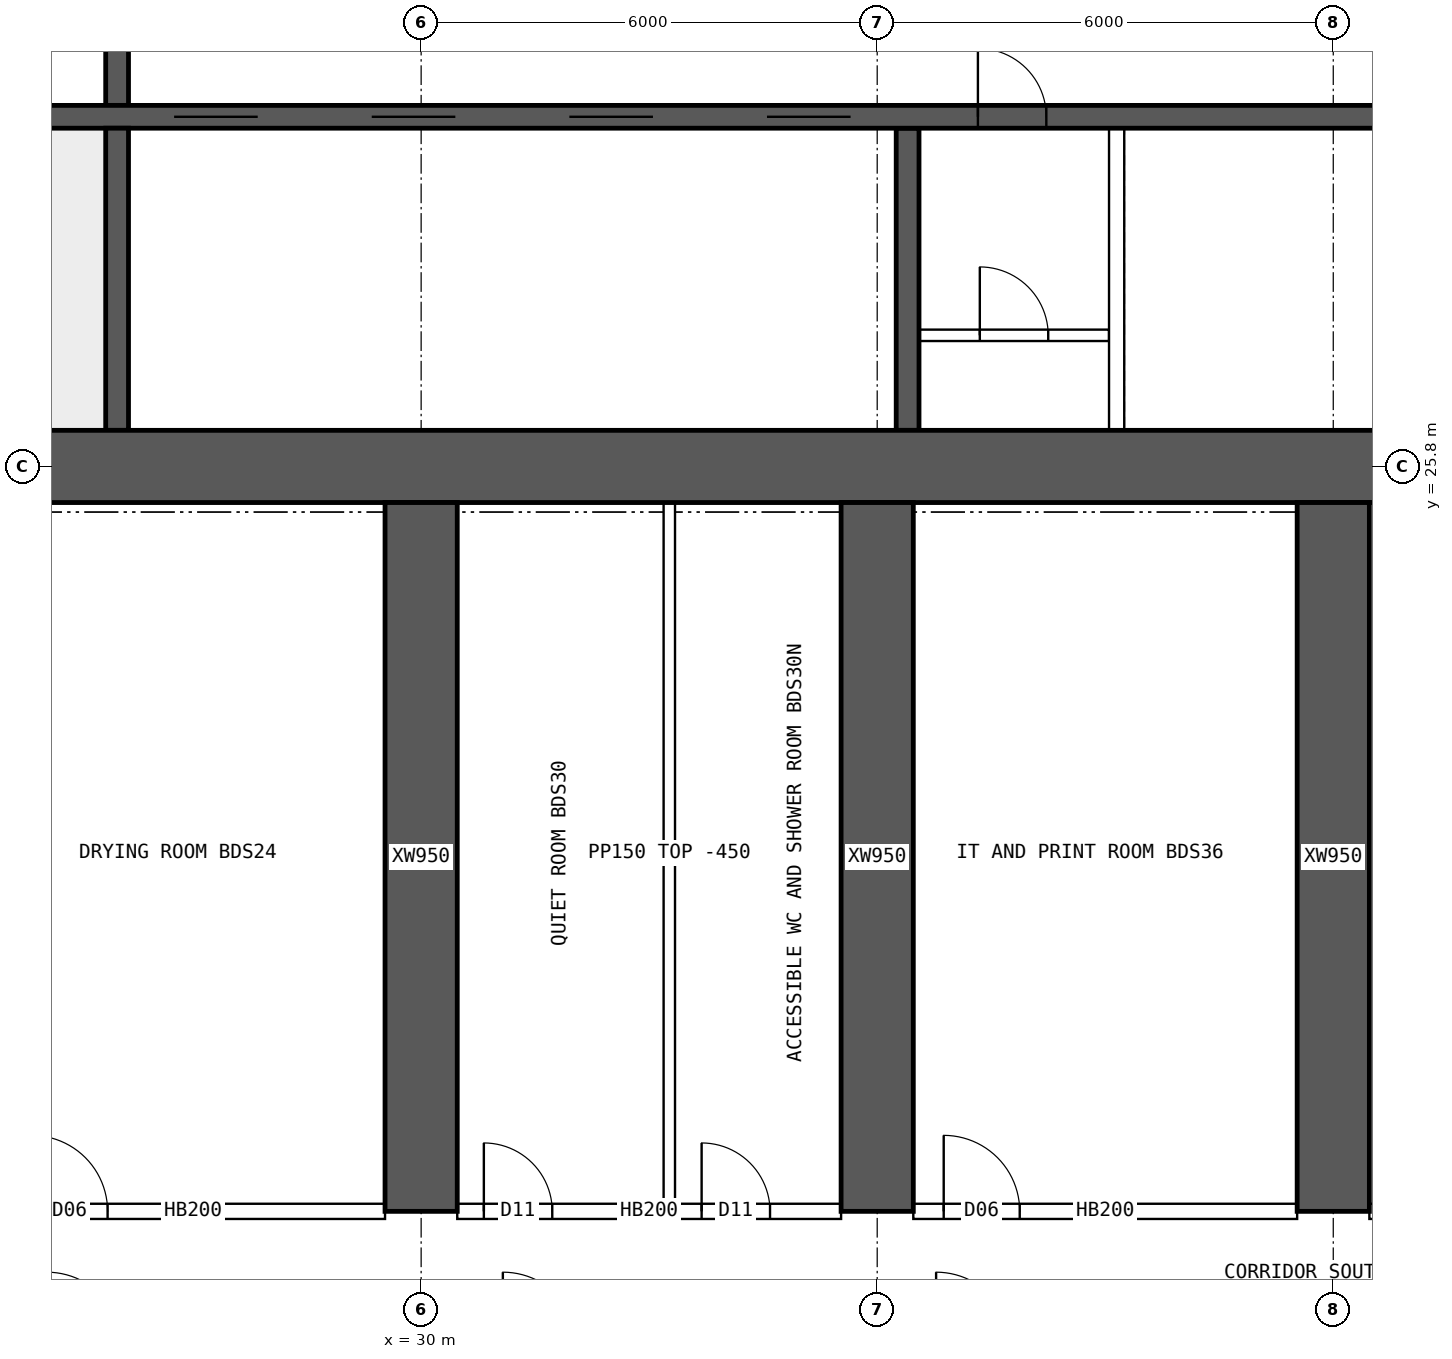
"""IFC4 building model, lengths in metres.
Left out: names, types, materials, properties, quantities, classifications, styles, units other than length and angle.
Written with IfcOpenShell. Run it as: python <this file> out.ifc"""

import sys

from ifc_helpers import new_model, si_unit, direction, frame, frame_2d, origin, place, context, subcontext, project, spatial, rectangle, extrude, element, fill, save


model = new_model("IFC4")
c1 = context("Model", 3, precision=1e-05, world=origin(), true_north=direction((0.0, 1.0)))
c2 = subcontext(c1, "Body", "Model", "MODEL_VIEW")
j1 = project(units=[si_unit("LENGTHUNIT", "METRE"), si_unit("PLANEANGLEUNIT", "RADIAN")], contexts=[c1])
p1 = place(None, origin())
s1 = spatial("IfcSite", under=j1, at=p1, CompositionType="ELEMENT")
p2 = place(p1, origin())
s2 = spatial("IfcBuilding", under=s1, at=p2, CompositionType="ELEMENT")
p3 = place(p2, frame((0.0, 0.0, 110.65)))
s3 = spatial("IfcBuildingStorey", under=s2, at=p3, CompositionType="ELEMENT", Elevation=110.65)
p4 = place(p3, frame((18.0, 25.8, 0.0), z_axis=(0.0, 0.0, 1.0), x_axis=(1.0, 0.0, 0.0)))
e1 = element("IfcWall", 1, at=p4, inside=s3, PredefinedType="SHEAR", context=c2, shape_type="SweptSolid", body=[
    extrude(rectangle(XDim=48.0, YDim=0.95, at=frame_2d((24.0, 0.0))), origin(), (0.0, 0.0, 1.0), 3.75),
])
p5 = place(p3, frame((18.475, 30.4, 0.0), z_axis=(0.0, 0.0, 1.0), x_axis=(1.0, 0.0, 0.0)))
e2 = element("IfcWall", 2, at=p5, inside=s3, PredefinedType="SHEAR", context=c2, shape_type="SweptSolid", body=[
    extrude(rectangle(XDim=47.05, YDim=0.3, at=frame_2d((23.525, 0.0))), origin(), (0.0, 0.0, 1.0), 3.75),
])
p6 = place(p5, frame((0.4, 0.0, 0.0)))
e3 = element("IfcOpeningElement", 3, at=p6, cuts=e2, PredefinedType="OPENING", context=c2, shape_type="SweptSolid", body=[
    extrude(rectangle(XDim=1.0, YDim=2.1, at=frame_2d((0.5, 1.05))), frame((0.0, 0.16, 0.0), z_axis=(0.0, -1.0, 0.0), x_axis=(1.0, 0.0, 0.0)), (0.0, 0.0, 1.0), 0.32),
])
p7 = place(p5, frame((45.65, 0.0, 0.0)))
e4 = element("IfcOpeningElement", 4, at=p7, cuts=e2, PredefinedType="OPENING", context=c2, shape_type="SweptSolid", body=[
    extrude(rectangle(XDim=1.0, YDim=2.1, at=frame_2d((0.5, 1.05))), frame((0.0, 0.16, 0.0), z_axis=(0.0, -1.0, 0.0), x_axis=(1.0, 0.0, 0.0)), (0.0, 0.0, 1.0), 0.32),
])
p8 = place(p5, frame((8.275, 0.0, 0.0)))
e5 = element("IfcOpeningElement", 5, at=p8, cuts=e2, PredefinedType="OPENING", context=c2, shape_type="SweptSolid", body=[
    extrude(rectangle(XDim=1.1, YDim=2.1, at=frame_2d((0.55, 1.05))), frame((0.0, 0.16, 0.0), z_axis=(0.0, -1.0, 0.0), x_axis=(1.0, 0.0, 0.0)), (0.0, 0.0, 1.0), 0.32),
])
p9 = place(p5, frame((10.875, 0.0, 0.0)))
e6 = element("IfcOpeningElement", 6, at=p9, cuts=e2, PredefinedType="OPENING", context=c2, shape_type="SweptSolid", body=[
    extrude(rectangle(XDim=1.1, YDim=2.1, at=frame_2d((0.55, 1.05))), frame((0.0, 0.16, 0.0), z_axis=(0.0, -1.0, 0.0), x_axis=(1.0, 0.0, 0.0)), (0.0, 0.0, 1.0), 0.32),
])
p10 = place(p5, frame((13.475, 0.0, 0.0)))
e7 = element("IfcOpeningElement", 7, at=p10, cuts=e2, PredefinedType="OPENING", context=c2, shape_type="SweptSolid", body=[
    extrude(rectangle(XDim=1.1, YDim=2.1, at=frame_2d((0.55, 1.05))), frame((0.0, 0.16, 0.0), z_axis=(0.0, -1.0, 0.0), x_axis=(1.0, 0.0, 0.0)), (0.0, 0.0, 1.0), 0.32),
])
p11 = place(p5, frame((16.075, 0.0, 0.0)))
e8 = element("IfcOpeningElement", 8, at=p11, cuts=e2, PredefinedType="OPENING", context=c2, shape_type="SweptSolid", body=[
    extrude(rectangle(XDim=1.1, YDim=2.1, at=frame_2d((0.55, 1.05))), frame((0.0, 0.16, 0.0), z_axis=(0.0, -1.0, 0.0), x_axis=(1.0, 0.0, 0.0)), (0.0, 0.0, 1.0), 0.32),
])
p12 = place(p5, frame((18.85, 0.0, 0.0)))
e9 = element("IfcOpeningElement", 9, at=p12, cuts=e2, PredefinedType="OPENING", context=c2, shape_type="SweptSolid", body=[
    extrude(rectangle(XDim=0.9, YDim=2.1, at=frame_2d((0.45, 1.05))), frame((0.0, 0.16, 0.0), z_axis=(0.0, -1.0, 0.0), x_axis=(1.0, 0.0, 0.0)), (0.0, 0.0, 1.0), 0.32),
])
p13 = place(p5, frame((30.142, 0.0, 0.0)))
e10 = element("IfcOpeningElement", 10, at=p13, cuts=e2, PredefinedType="OPENING", context=c2, shape_type="SweptSolid", body=[
    extrude(rectangle(XDim=1.1, YDim=2.1, at=frame_2d((0.55, 1.05))), frame((0.0, 0.16, 0.0), z_axis=(0.0, -1.0, 0.0), x_axis=(1.0, 0.0, 0.0)), (0.0, 0.0, 1.0), 0.32),
])
p14 = place(p5, frame((33.675, 0.0, 0.0)))
e11 = element("IfcOpeningElement", 11, at=p14, cuts=e2, PredefinedType="OPENING", context=c2, shape_type="SweptSolid", body=[
    extrude(rectangle(XDim=1.1, YDim=2.1, at=frame_2d((0.55, 1.05))), frame((0.0, 0.16, 0.0), z_axis=(0.0, -1.0, 0.0), x_axis=(1.0, 0.0, 0.0)), (0.0, 0.0, 1.0), 0.32),
])
p15 = place(p5, frame((37.208, 0.0, 0.0)))
e12 = element("IfcOpeningElement", 12, at=p15, cuts=e2, PredefinedType="OPENING", context=c2, shape_type="SweptSolid", body=[
    extrude(rectangle(XDim=1.1, YDim=2.1, at=frame_2d((0.55, 1.05))), frame((0.0, 0.16, 0.0), z_axis=(0.0, -1.0, 0.0), x_axis=(1.0, 0.0, 0.0)), (0.0, 0.0, 1.0), 0.32),
])
p16 = place(p3, frame((26.0, 26.275, 0.0), z_axis=(0.0, 0.0, 1.0), x_axis=(0.0, 1.0, 0.0)))
e13 = element("IfcWall", 13, at=p16, inside=s3, PredefinedType="SHEAR", context=c2, shape_type="SweptSolid", body=[
    extrude(rectangle(XDim=3.975, YDim=0.3, at=frame_2d((1.988, 0.0))), origin(), (0.0, 0.0, 1.0), 3.75),
])
p17 = place(p3, frame((26.0, 30.55, 0.0), z_axis=(0.0, 0.0, 1.0), x_axis=(0.0, 1.0, 0.0)))
e14 = element("IfcWall", 14, at=p17, inside=s3, PredefinedType="SHEAR", context=c2, shape_type="SweptSolid", body=[
    extrude(rectangle(XDim=3.9, YDim=0.3, at=frame_2d((1.95, 0.0))), origin(), (0.0, 0.0, 1.0), 3.75),
])
p18 = place(p17, frame((1.4, 0.0, 0.0)))
e15 = element("IfcOpeningElement", 15, at=p18, cuts=e14, PredefinedType="OPENING", context=c2, shape_type="SweptSolid", body=[
    extrude(rectangle(XDim=1.2, YDim=2.1, at=frame_2d((0.6, 1.05))), frame((0.0, 0.16, 0.0), z_axis=(0.0, -1.0, 0.0), x_axis=(1.0, 0.0, 0.0)), (0.0, 0.0, 1.0), 0.32),
])
p19 = place(p3, frame((36.4, 26.275, 0.0), z_axis=(0.0, 0.0, 1.0), x_axis=(0.0, 1.0, 0.0)))
e16 = element("IfcWall", 16, at=p19, inside=s3, PredefinedType="SHEAR", context=c2, shape_type="SweptSolid", body=[
    extrude(rectangle(XDim=3.975, YDim=0.3, at=frame_2d((1.988, 0.0))), origin(), (0.0, 0.0, 1.0), 3.75),
])
for number, where, z_axis, x_axis in (
    (17, (30.0, 16.0, 0.0), (0.0, 0.0, 1.0), (0.0, 1.0, 0.0)),
    (18, (36.0, 16.0, 0.0), (0.0, 0.0, 1.0), (0.0, 1.0, 0.0)),
    (19, (42.0, 16.0, 0.0), (0.0, 0.0, 1.0), (0.0, 1.0, 0.0)),
):
    element("IfcWall", number, at=place(p3, frame(where, z_axis=z_axis, x_axis=x_axis)), inside=s3, PredefinedType="SHEAR", context=c2, shape_type="SweptSolid", body=[
        extrude(rectangle(XDim=9.325, YDim=0.95, at=frame_2d((4.663, 0.0))), origin(), (0.0, 0.0, 1.0), 3.75),
    ])
p20 = place(p3, frame((36.55, 27.525, 0.0), z_axis=(0.0, 0.0, 1.0), x_axis=(1.0, 0.0, 0.0)))
e20 = element("IfcWall", 20, at=p20, inside=s3, PredefinedType="SOLIDWALL", context=c2, shape_type="SweptSolid", body=[
    extrude(rectangle(XDim=2.5, YDim=0.15, at=frame_2d((1.25, 0.0))), origin(), (0.0, 0.0, 1.0), 3.3),
])
p21 = place(p20, frame((0.8, 0.0, 0.0)))
e21 = element("IfcOpeningElement", 21, at=p21, cuts=e20, PredefinedType="OPENING", context=c2, shape_type="SweptSolid", body=[
    extrude(rectangle(XDim=0.9, YDim=2.1, at=frame_2d((0.45, 1.05))), frame((0.0, 0.085, 0.0), z_axis=(0.0, -1.0, 0.0), x_axis=(1.0, 0.0, 0.0)), (0.0, 0.0, 1.0), 0.17),
])
p22 = place(p3, frame((39.15, 26.275, 0.0), z_axis=(0.0, 0.0, 1.0), x_axis=(0.0, 1.0, 0.0)))
e22 = element("IfcWall", 22, at=p22, inside=s3, PredefinedType="SOLIDWALL", context=c2, shape_type="SweptSolid", body=[
    extrude(rectangle(XDim=3.975, YDim=0.2, at=frame_2d((1.988, 0.0))), origin(), (0.0, 0.0, 1.0), 3.3),
])
p23 = place(p3, frame((24.475, 16.0, 0.0), z_axis=(0.0, 0.0, 1.0), x_axis=(1.0, 0.0, 0.0)))
e23 = element("IfcWall", 23, at=p23, inside=s3, PredefinedType="SOLIDWALL", context=c2, shape_type="SweptSolid", body=[
    extrude(rectangle(XDim=5.05, YDim=0.2, at=frame_2d((2.525, 0.0))), origin(), (0.0, 0.0, 1.0), 3.3),
])
p24 = place(p23, frame((0.4, 0.0, 0.0)))
e24 = element("IfcOpeningElement", 24, at=p24, cuts=e23, PredefinedType="OPENING", context=c2, shape_type="SweptSolid", body=[
    extrude(rectangle(XDim=1.0, YDim=2.1, at=frame_2d((0.5, 1.05))), frame((0.0, 0.11, 0.0), z_axis=(0.0, -1.0, 0.0), x_axis=(1.0, 0.0, 0.0)), (0.0, 0.0, 1.0), 0.22),
])
p25 = place(p3, frame((30.475, 16.0, 0.0), z_axis=(0.0, 0.0, 1.0), x_axis=(1.0, 0.0, 0.0)))
e25 = element("IfcWall", 25, at=p25, inside=s3, PredefinedType="SOLIDWALL", context=c2, shape_type="SweptSolid", body=[
    extrude(rectangle(XDim=5.05, YDim=0.2, at=frame_2d((2.525, 0.0))), origin(), (0.0, 0.0, 1.0), 3.3),
])
p26 = place(p25, frame((0.35, 0.0, 0.0)))
e26 = element("IfcOpeningElement", 26, at=p26, cuts=e25, PredefinedType="OPENING", context=c2, shape_type="SweptSolid", body=[
    extrude(rectangle(XDim=0.9, YDim=2.1, at=frame_2d((0.45, 1.05))), frame((0.0, 0.11, 0.0), z_axis=(0.0, -1.0, 0.0), x_axis=(1.0, 0.0, 0.0)), (0.0, 0.0, 1.0), 0.22),
])
p27 = place(p25, frame((3.215, 0.0, 0.0)))
e27 = element("IfcOpeningElement", 27, at=p27, cuts=e25, PredefinedType="OPENING", context=c2, shape_type="SweptSolid", body=[
    extrude(rectangle(XDim=0.9, YDim=2.1, at=frame_2d((0.45, 1.05))), frame((0.0, 0.11, 0.0), z_axis=(0.0, -1.0, 0.0), x_axis=(1.0, 0.0, 0.0)), (0.0, 0.0, 1.0), 0.22),
])
p28 = place(p3, frame((36.475, 16.0, 0.0), z_axis=(0.0, 0.0, 1.0), x_axis=(1.0, 0.0, 0.0)))
e28 = element("IfcWall", 28, at=p28, inside=s3, PredefinedType="SOLIDWALL", context=c2, shape_type="SweptSolid", body=[
    extrude(rectangle(XDim=5.05, YDim=0.2, at=frame_2d((2.525, 0.0))), origin(), (0.0, 0.0, 1.0), 3.3),
])
p29 = place(p28, frame((0.4, 0.0, 0.0)))
e29 = element("IfcOpeningElement", 29, at=p29, cuts=e28, PredefinedType="OPENING", context=c2, shape_type="SweptSolid", body=[
    extrude(rectangle(XDim=1.0, YDim=2.1, at=frame_2d((0.5, 1.05))), frame((0.0, 0.11, 0.0), z_axis=(0.0, -1.0, 0.0), x_axis=(1.0, 0.0, 0.0)), (0.0, 0.0, 1.0), 0.22),
])
p30 = place(p3, frame((42.475, 16.0, 0.0), z_axis=(0.0, 0.0, 1.0), x_axis=(1.0, 0.0, 0.0)))
e30 = element("IfcWall", 30, at=p30, inside=s3, PredefinedType="SOLIDWALL", context=c2, shape_type="SweptSolid", body=[
    extrude(rectangle(XDim=5.05, YDim=0.2, at=frame_2d((2.525, 0.0))), origin(), (0.0, 0.0, 1.0), 3.3),
])
p31 = place(p30, frame((0.35, 0.0, 0.0)))
e31 = element("IfcOpeningElement", 31, at=p31, cuts=e30, PredefinedType="OPENING", context=c2, shape_type="SweptSolid", body=[
    extrude(rectangle(XDim=0.9, YDim=2.1, at=frame_2d((0.45, 1.05))), frame((0.0, 0.11, 0.0), z_axis=(0.0, -1.0, 0.0), x_axis=(1.0, 0.0, 0.0)), (0.0, 0.0, 1.0), 0.22),
])
p32 = place(p30, frame((3.645, 0.0, 0.0)))
e32 = element("IfcOpeningElement", 32, at=p32, cuts=e30, PredefinedType="OPENING", context=c2, shape_type="SweptSolid", body=[
    extrude(rectangle(XDim=0.9, YDim=2.1, at=frame_2d((0.45, 1.05))), frame((0.0, 0.11, 0.0), z_axis=(0.0, -1.0, 0.0), x_axis=(1.0, 0.0, 0.0)), (0.0, 0.0, 1.0), 0.22),
])
p33 = place(p3, frame((33.265, 16.1, 0.0), z_axis=(0.0, 0.0, 1.0), x_axis=(0.0, 1.0, 0.0)))
e33 = element("IfcWall", 33, at=p33, inside=s3, PredefinedType="PARTITIONING", context=c2, shape_type="SweptSolid", body=[
    extrude(rectangle(XDim=9.225, YDim=0.15, at=frame_2d((4.612, 0.0))), origin(), (0.0, 0.0, 1.0), 3.3),
])
p34 = place(p8, origin())
e34 = element("IfcDoor", 34, at=p34, inside=s3, OperationType="DOUBLE_DOOR_SLIDING", PredefinedType="DOOR", context=c2, shape_type="SweptSolid", body=[
    extrude(rectangle(XDim=1.1, YDim=2.1, at=frame_2d((0.55, 1.05))), frame((0.0, 0.025, 0.0), z_axis=(0.0, -1.0, 0.0), x_axis=(1.0, 0.0, 0.0)), (0.0, 0.0, 1.0), 0.05),
])
fill(e5, e34)
p35 = place(p9, origin())
e35 = element("IfcDoor", 35, at=p35, inside=s3, OperationType="DOUBLE_DOOR_SLIDING", PredefinedType="DOOR", context=c2, shape_type="SweptSolid", body=[
    extrude(rectangle(XDim=1.1, YDim=2.1, at=frame_2d((0.55, 1.05))), frame((0.0, 0.025, 0.0), z_axis=(0.0, -1.0, 0.0), x_axis=(1.0, 0.0, 0.0)), (0.0, 0.0, 1.0), 0.05),
])
fill(e6, e35)
p36 = place(p10, origin())
e36 = element("IfcDoor", 36, at=p36, inside=s3, OperationType="DOUBLE_DOOR_SLIDING", PredefinedType="DOOR", context=c2, shape_type="SweptSolid", body=[
    extrude(rectangle(XDim=1.1, YDim=2.1, at=frame_2d((0.55, 1.05))), frame((0.0, 0.025, 0.0), z_axis=(0.0, -1.0, 0.0), x_axis=(1.0, 0.0, 0.0)), (0.0, 0.0, 1.0), 0.05),
])
fill(e7, e36)
p37 = place(p11, origin())
e37 = element("IfcDoor", 37, at=p37, inside=s3, OperationType="DOUBLE_DOOR_SLIDING", PredefinedType="DOOR", context=c2, shape_type="SweptSolid", body=[
    extrude(rectangle(XDim=1.1, YDim=2.1, at=frame_2d((0.55, 1.05))), frame((0.0, 0.025, 0.0), z_axis=(0.0, -1.0, 0.0), x_axis=(1.0, 0.0, 0.0)), (0.0, 0.0, 1.0), 0.05),
])
fill(e8, e37)
p38 = place(p21, origin())
e38 = element("IfcDoor", 38, at=p38, inside=s3, OperationType="SINGLE_SWING_LEFT", PredefinedType="DOOR", context=c2, shape_type="SweptSolid", body=[
    extrude(rectangle(XDim=0.9, YDim=2.1, at=frame_2d((0.45, 1.05))), frame((0.0, 0.025, 0.0), z_axis=(0.0, -1.0, 0.0), x_axis=(1.0, 0.0, 0.0)), (0.0, 0.0, 1.0), 0.05),
])
fill(e21, e38)
p39 = place(p12, origin())
e39 = element("IfcDoor", 39, at=p39, inside=s3, OperationType="SINGLE_SWING_LEFT", PredefinedType="DOOR", context=c2, shape_type="SweptSolid", body=[
    extrude(rectangle(XDim=0.9, YDim=2.1, at=frame_2d((0.45, 1.05))), frame((0.0, 0.025, 0.0), z_axis=(0.0, -1.0, 0.0), x_axis=(1.0, 0.0, 0.0)), (0.0, 0.0, 1.0), 0.05),
])
fill(e9, e39)
p40 = place(p24, origin())
e40 = element("IfcDoor", 40, at=p40, inside=s3, OperationType="SINGLE_SWING_LEFT", PredefinedType="DOOR", context=c2, shape_type="SweptSolid", body=[
    extrude(rectangle(XDim=1.0, YDim=2.1, at=frame_2d((0.5, 1.05))), frame((0.0, 0.025, 0.0), z_axis=(0.0, -1.0, 0.0), x_axis=(1.0, 0.0, 0.0)), (0.0, 0.0, 1.0), 0.05),
])
fill(e24, e40)
p41 = place(p26, origin())
e41 = element("IfcDoor", 41, at=p41, inside=s3, OperationType="SINGLE_SWING_LEFT", PredefinedType="DOOR", context=c2, shape_type="SweptSolid", body=[
    extrude(rectangle(XDim=0.9, YDim=2.1, at=frame_2d((0.45, 1.05))), frame((0.0, 0.025, 0.0), z_axis=(0.0, -1.0, 0.0), x_axis=(1.0, 0.0, 0.0)), (0.0, 0.0, 1.0), 0.05),
])
fill(e26, e41)
p42 = place(p27, origin())
e42 = element("IfcDoor", 42, at=p42, inside=s3, OperationType="SINGLE_SWING_LEFT", PredefinedType="DOOR", context=c2, shape_type="SweptSolid", body=[
    extrude(rectangle(XDim=0.9, YDim=2.1, at=frame_2d((0.45, 1.05))), frame((0.0, 0.025, 0.0), z_axis=(0.0, -1.0, 0.0), x_axis=(1.0, 0.0, 0.0)), (0.0, 0.0, 1.0), 0.05),
])
fill(e27, e42)
p43 = place(p29, origin())
e43 = element("IfcDoor", 43, at=p43, inside=s3, OperationType="SINGLE_SWING_LEFT", PredefinedType="DOOR", context=c2, shape_type="SweptSolid", body=[
    extrude(rectangle(XDim=1.0, YDim=2.1, at=frame_2d((0.5, 1.05))), frame((0.0, 0.025, 0.0), z_axis=(0.0, -1.0, 0.0), x_axis=(1.0, 0.0, 0.0)), (0.0, 0.0, 1.0), 0.05),
])
fill(e29, e43)
save(model, sys.argv[1])
